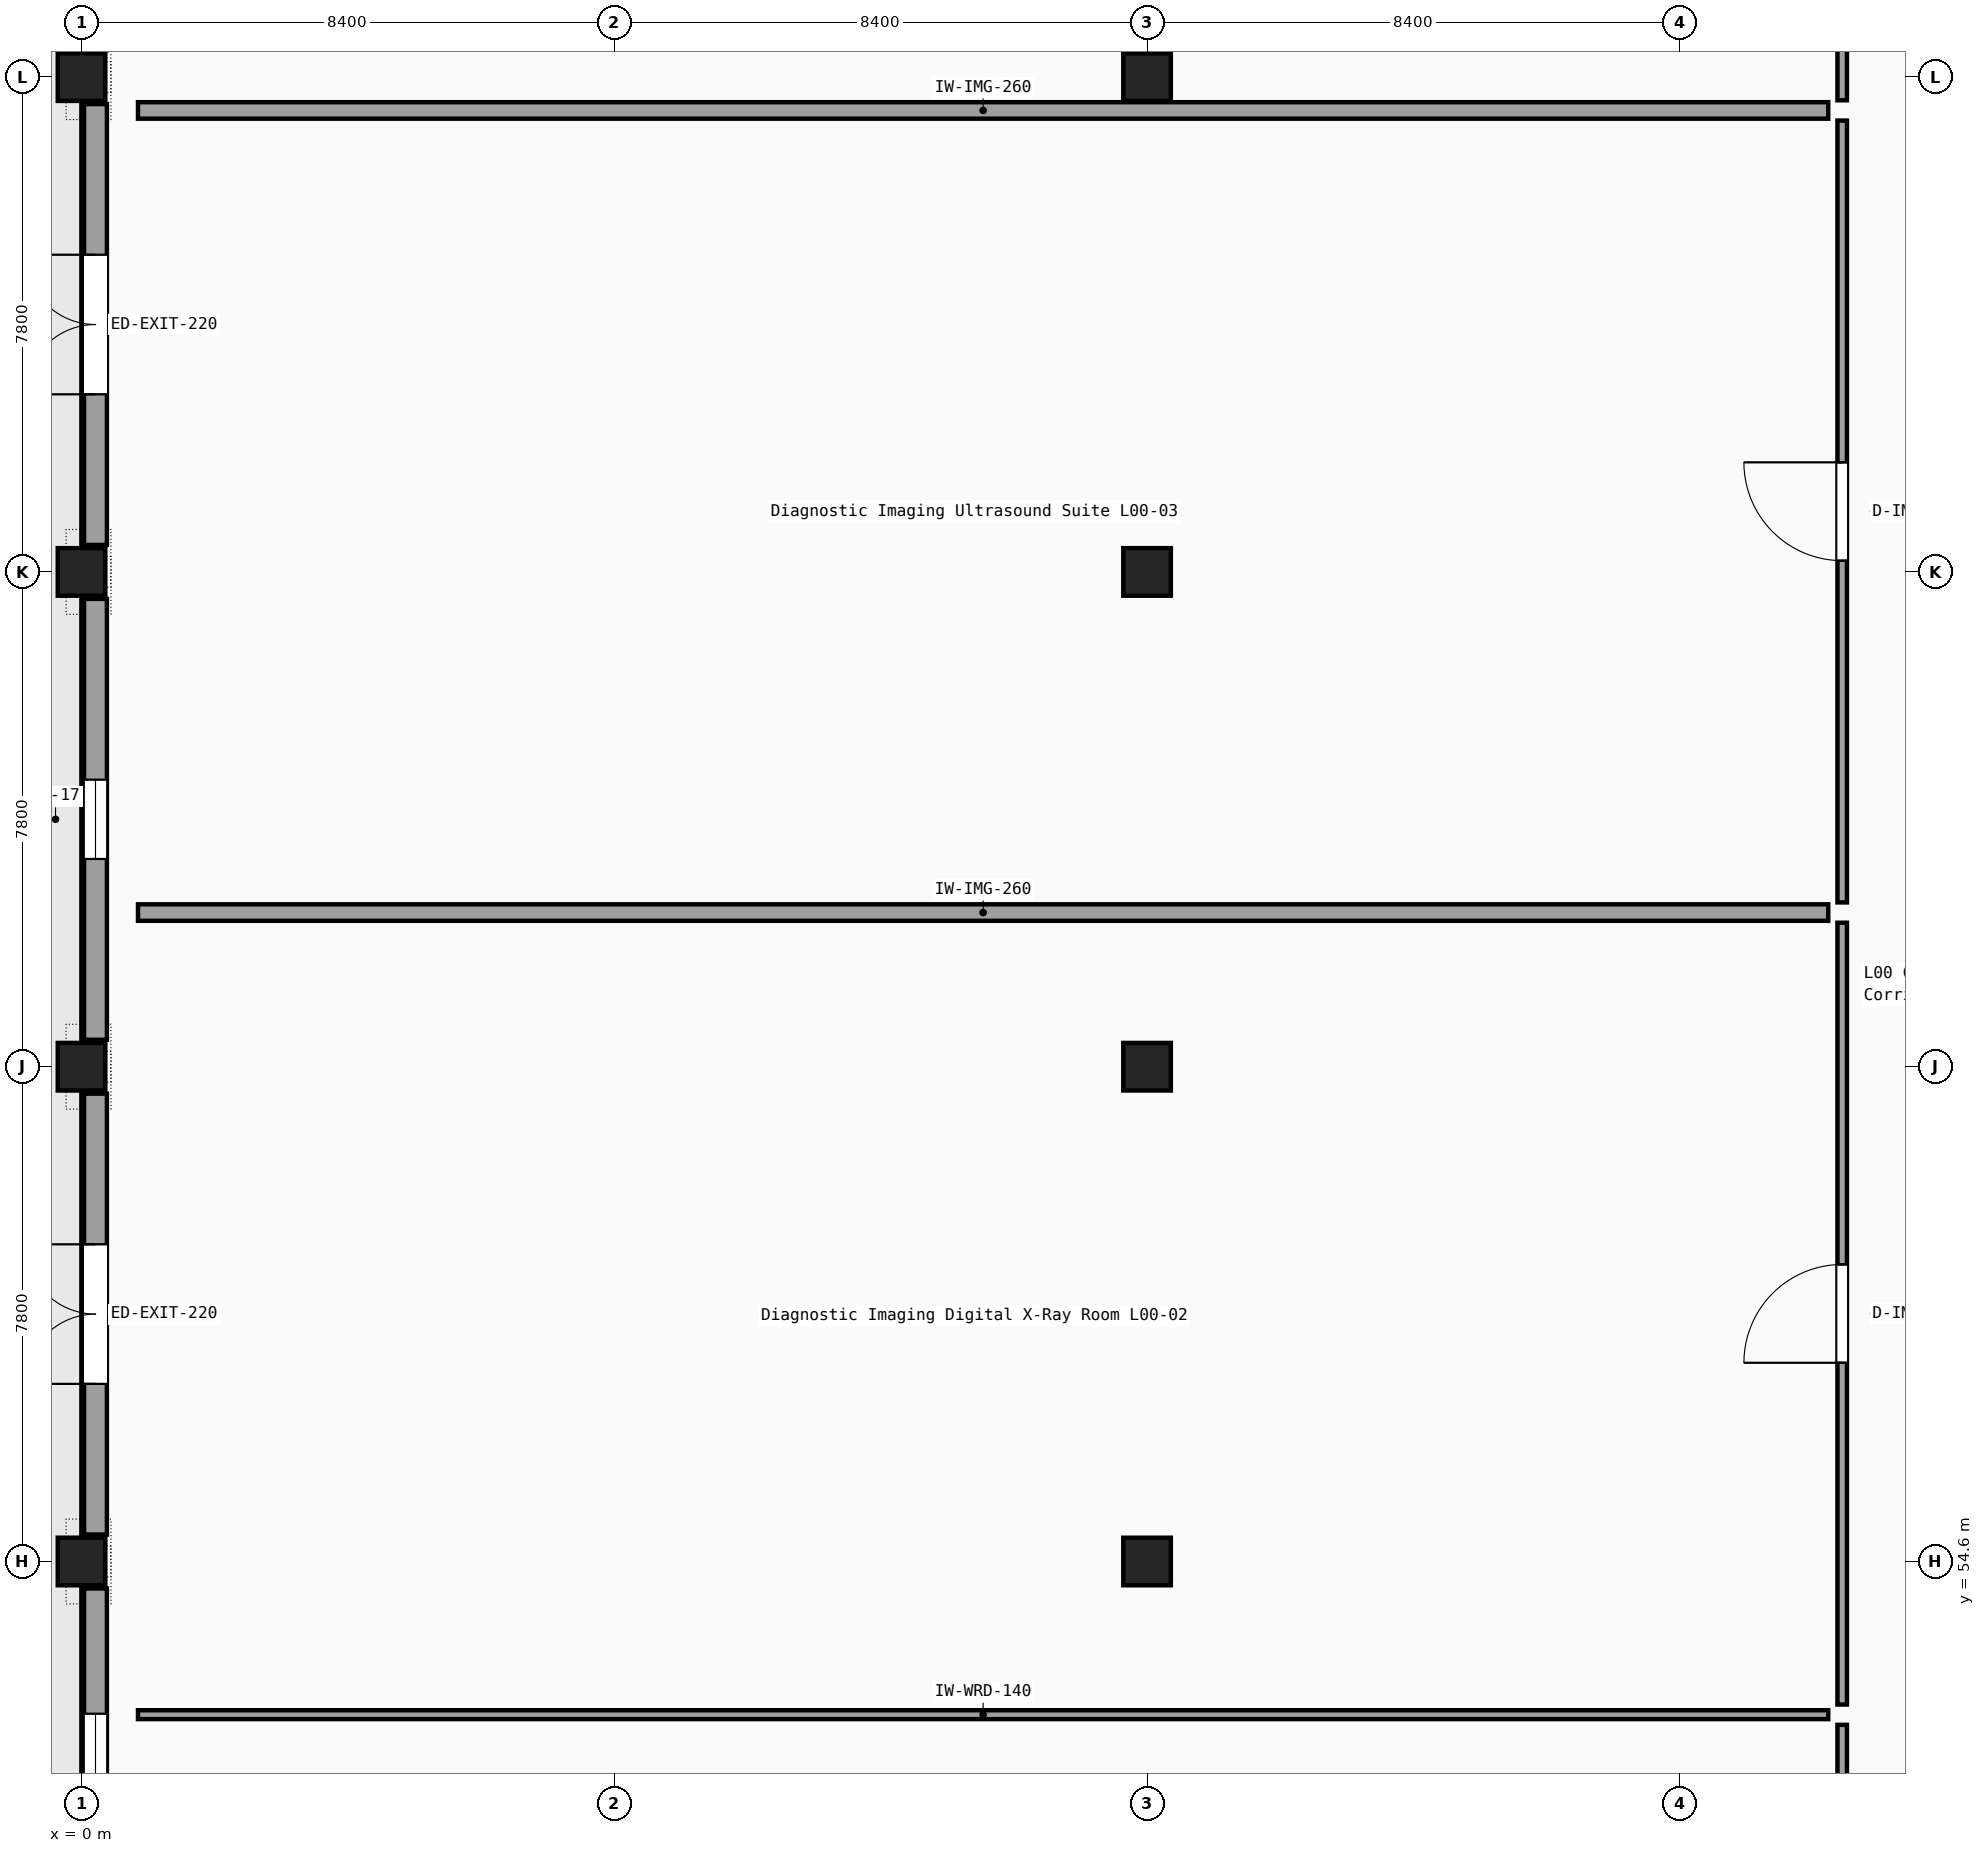
"""IFC4 building model, lengths in metres.
Left out: names, types, materials, properties, quantities, classifications, styles, units other than length and angle.
Written with IfcOpenShell. Run it as: python <this file> out.ifc"""

import sys

from ifc_helpers import new_model, si_unit, direction, frame, frame_2d, origin, origin_2d, place, context, subcontext, project, spatial, rectangle, extrude, element, fill, save


model = new_model("IFC4")
c1 = context("Model", 3, precision=1e-05, world=origin(), true_north=direction((0.0, 1.0)))
c2 = subcontext(c1, "Body", "Model", "MODEL_VIEW")
j1 = project(units=[si_unit("LENGTHUNIT", "METRE"), si_unit("PLANEANGLEUNIT", "RADIAN")], contexts=[c1])
p1 = place(None, origin())
s1 = spatial("IfcSite", under=j1, at=p1, CompositionType="ELEMENT")
p2 = place(p1, origin())
s2 = spatial("IfcBuilding", under=s1, at=p2, CompositionType="ELEMENT")
p3 = place(p2, origin())
s3 = spatial("IfcBuildingStorey", under=s2, at=p3, CompositionType="ELEMENT", Elevation=0.0)
for number, where, z_axis, x_axis in (
    (1, (0.0, 54.6, 0.0), (0.0, 0.0, 1.0), (1.0, 0.0, 0.0)),
    (2, (0.0, 62.4, 0.0), (0.0, 0.0, 1.0), (1.0, 0.0, 0.0)),
    (3, (0.0, 70.2, 0.0), (0.0, 0.0, 1.0), (1.0, 0.0, 0.0)),
    (4, (0.0, 78.0, 0.0), (0.0, 0.0, 1.0), (1.0, 0.0, 0.0)),
    (5, (16.8, 54.6, 0.0), (0.0, 0.0, 1.0), (1.0, 0.0, 0.0)),
    (6, (16.8, 62.4, 0.0), (0.0, 0.0, 1.0), (1.0, 0.0, 0.0)),
    (7, (16.8, 70.2, 0.0), (0.0, 0.0, 1.0), (1.0, 0.0, 0.0)),
    (8, (16.8, 78.0, 0.0), (0.0, 0.0, 1.0), (1.0, 0.0, 0.0)),
):
    element("IfcColumn", number, at=place(p3, frame(where, z_axis=z_axis, x_axis=x_axis)), inside=s3, PredefinedType="COLUMN", context=c2, shape_type="SweptSolid", body=[
        extrude(rectangle(XDim=0.75, YDim=0.75, at=origin_2d()), origin(), (0.0, 0.0, 1.0), 5.1),
    ])
p4 = place(p3, frame((0.22, 47.225, 0.0), z_axis=(0.0, 0.0, 1.0), x_axis=(0.0, 1.0, 0.0)))
e9 = element("IfcWall", 9, at=p4, inside=s3, PredefinedType="SOLIDWALL", context=c2, shape_type="SweptSolid", body=[
    extrude(rectangle(XDim=6.95, YDim=0.36, at=frame_2d((3.475, 0.0))), origin(), (0.0, 0.0, 1.0), 4.26),
])
p5 = place(p4, frame((1.975, 0.0, 0.7)))
e10 = element("IfcOpeningElement", 10, at=p5, cuts=e9, PredefinedType="OPENING", context=c2, shape_type="SweptSolid", body=[
    extrude(rectangle(XDim=3.0, YDim=1.85, at=frame_2d((1.5, 0.925))), frame((0.0, 0.19, 0.0), z_axis=(0.0, -1.0, 0.0), x_axis=(1.0, 0.0, 0.0)), (0.0, 0.0, 1.0), 0.38),
])
p6 = place(p3, frame((0.22, 55.025, 0.0), z_axis=(0.0, 0.0, 1.0), x_axis=(0.0, 1.0, 0.0)))
e11 = element("IfcWall", 11, at=p6, inside=s3, PredefinedType="SOLIDWALL", context=c2, shape_type="SweptSolid", body=[
    extrude(rectangle(XDim=6.95, YDim=0.36, at=frame_2d((3.475, 0.0))), origin(), (0.0, 0.0, 1.0), 4.26),
])
p7 = place(p6, frame((2.375, 0.0, 0.0)))
e12 = element("IfcOpeningElement", 12, at=p7, cuts=e11, PredefinedType="OPENING", context=c2, shape_type="SweptSolid", body=[
    extrude(rectangle(XDim=2.2, YDim=2.3, at=frame_2d((1.1, 1.15))), frame((0.0, 0.19, 0.0), z_axis=(0.0, -1.0, 0.0), x_axis=(1.0, 0.0, 0.0)), (0.0, 0.0, 1.0), 0.38),
])
p8 = place(p3, frame((0.22, 62.825, 0.0), z_axis=(0.0, 0.0, 1.0), x_axis=(0.0, 1.0, 0.0)))
e13 = element("IfcWall", 13, at=p8, inside=s3, PredefinedType="SOLIDWALL", context=c2, shape_type="SweptSolid", body=[
    extrude(rectangle(XDim=6.95, YDim=0.36, at=frame_2d((3.475, 0.0))), origin(), (0.0, 0.0, 1.0), 4.21),
])
p9 = place(p8, frame((2.85, 0.0, 0.95)))
e14 = element("IfcOpeningElement", 14, at=p9, cuts=e13, PredefinedType="OPENING", context=c2, shape_type="SweptSolid", body=[
    extrude(rectangle(XDim=1.25, YDim=1.5, at=frame_2d((0.625, 0.75))), frame((0.0, 0.19, 0.0), z_axis=(0.0, -1.0, 0.0), x_axis=(1.0, 0.0, 0.0)), (0.0, 0.0, 1.0), 0.38),
])
p10 = place(p3, frame((0.22, 70.625, 0.0), z_axis=(0.0, 0.0, 1.0), x_axis=(0.0, 1.0, 0.0)))
e15 = element("IfcWall", 15, at=p10, inside=s3, PredefinedType="SOLIDWALL", context=c2, shape_type="SweptSolid", body=[
    extrude(rectangle(XDim=6.95, YDim=0.36, at=frame_2d((3.475, 0.0))), origin(), (0.0, 0.0, 1.0), 4.21),
])
p11 = place(p10, frame((2.375, 0.0, 0.0)))
e16 = element("IfcOpeningElement", 16, at=p11, cuts=e15, PredefinedType="OPENING", context=c2, shape_type="SweptSolid", body=[
    extrude(rectangle(XDim=2.2, YDim=2.3, at=frame_2d((1.1, 1.15))), frame((0.0, 0.19, 0.0), z_axis=(0.0, -1.0, 0.0), x_axis=(1.0, 0.0, 0.0)), (0.0, 0.0, 1.0), 0.38),
])
p12 = place(p3, frame((27.76, 39.62, 0.0), z_axis=(0.0, 0.0, 1.0), x_axis=(0.0, 1.0, 0.0)))
e17 = element("IfcWall", 17, at=p12, inside=s3, PredefinedType="PARTITIONING", context=c2, shape_type="SweptSolid", body=[
    extrude(rectangle(XDim=12.405, YDim=0.15, at=frame_2d((6.202, 0.0))), origin(), (0.0, 0.0, 1.0), 4.26),
])
p13 = place(p12, frame((5.502, 0.0, 0.0)))
e18 = element("IfcOpeningElement", 18, at=p13, cuts=e17, PredefinedType="OPENING", context=c2, shape_type="SweptSolid", body=[
    extrude(rectangle(XDim=1.4, YDim=2.2, at=frame_2d((0.7, 1.1))), frame((0.0, 0.085, 0.0), z_axis=(0.0, -1.0, 0.0), x_axis=(1.0, 0.0, 0.0)), (0.0, 0.0, 1.0), 0.17),
])
p14 = place(p3, frame((0.89, 52.185, 0.0), z_axis=(0.0, 0.0, 1.0), x_axis=(1.0, 0.0, 0.0)))
e19 = element("IfcWall", 19, at=p14, inside=s3, PredefinedType="PARTITIONING", context=c2, shape_type="SweptSolid", body=[
    extrude(rectangle(XDim=26.65, YDim=0.14, at=frame_2d((13.325, 0.0))), origin(), (0.0, 0.0, 1.0), 4.46),
])
p15 = place(p3, frame((27.76, 52.345, 0.0), z_axis=(0.0, 0.0, 1.0), x_axis=(0.0, 1.0, 0.0)))
e20 = element("IfcWall", 20, at=p15, inside=s3, PredefinedType="PARTITIONING", context=c2, shape_type="SweptSolid", body=[
    extrude(rectangle(XDim=12.325, YDim=0.15, at=frame_2d((6.163, 0.0))), origin(), (0.0, 0.0, 1.0), 4.26),
])
p16 = place(p15, frame((5.387, 0.0, 0.0)))
e21 = element("IfcOpeningElement", 21, at=p16, cuts=e20, PredefinedType="OPENING", context=c2, shape_type="SweptSolid", body=[
    extrude(rectangle(XDim=1.55, YDim=2.25, at=frame_2d((0.775, 1.125))), frame((0.0, 0.085, 0.0), z_axis=(0.0, -1.0, 0.0), x_axis=(1.0, 0.0, 0.0)), (0.0, 0.0, 1.0), 0.17),
])
p17 = place(p3, frame((0.89, 64.83, 0.0), z_axis=(0.0, 0.0, 1.0), x_axis=(1.0, 0.0, 0.0)))
e22 = element("IfcWall", 22, at=p17, inside=s3, PredefinedType="PARTITIONING", context=c2, shape_type="SweptSolid", body=[
    extrude(rectangle(XDim=26.65, YDim=0.26, at=frame_2d((13.325, 0.0))), origin(), (0.0, 0.0, 1.0), 4.46),
])
p18 = place(p3, frame((27.76, 64.99, 0.0), z_axis=(0.0, 0.0, 1.0), x_axis=(0.0, 1.0, 0.0)))
e23 = element("IfcWall", 23, at=p18, inside=s3, PredefinedType="PARTITIONING", context=c2, shape_type="SweptSolid", body=[
    extrude(rectangle(XDim=12.325, YDim=0.15, at=frame_2d((6.163, 0.0))), origin(), (0.0, 0.0, 1.0), 4.26),
])
p19 = place(p18, frame((5.387, 0.0, 0.0)))
e24 = element("IfcOpeningElement", 24, at=p19, cuts=e23, PredefinedType="OPENING", context=c2, shape_type="SweptSolid", body=[
    extrude(rectangle(XDim=1.55, YDim=2.25, at=frame_2d((0.775, 1.125))), frame((0.0, 0.085, 0.0), z_axis=(0.0, -1.0, 0.0), x_axis=(1.0, 0.0, 0.0)), (0.0, 0.0, 1.0), 0.17),
])
p20 = place(p3, frame((0.89, 77.475, 0.0), z_axis=(0.0, 0.0, 1.0), x_axis=(1.0, 0.0, 0.0)))
e25 = element("IfcWall", 25, at=p20, inside=s3, PredefinedType="PARTITIONING", context=c2, shape_type="SweptSolid", body=[
    extrude(rectangle(XDim=26.65, YDim=0.26, at=frame_2d((13.325, 0.0))), origin(), (0.0, 0.0, 1.0), 4.46),
])
p21 = place(p3, frame((27.76, 77.635, 0.0), z_axis=(0.0, 0.0, 1.0), x_axis=(0.0, 1.0, 0.0)))
e26 = element("IfcWall", 26, at=p21, inside=s3, PredefinedType="PARTITIONING", context=c2, shape_type="SweptSolid", body=[
    extrude(rectangle(XDim=12.405, YDim=0.15, at=frame_2d((6.203, 0.0))), origin(), (0.0, 0.0, 1.0), 4.26),
])
p22 = place(p21, frame((5.427, 0.0, 0.0)))
e27 = element("IfcOpeningElement", 27, at=p22, cuts=e26, PredefinedType="OPENING", context=c2, shape_type="SweptSolid", body=[
    extrude(rectangle(XDim=1.55, YDim=2.25, at=frame_2d((0.775, 1.125))), frame((0.0, 0.085, 0.0), z_axis=(0.0, -1.0, 0.0), x_axis=(1.0, 0.0, 0.0)), (0.0, 0.0, 1.0), 0.17),
])
p23 = place(p5, origin())
e28 = element("IfcWindow", 28, at=p23, inside=s3, PartitioningType="SINGLE_PANEL", PredefinedType="WINDOW", context=c2, shape_type="SweptSolid", body=[
    extrude(rectangle(XDim=3.0, YDim=1.85, at=frame_2d((1.5, 0.925))), frame((0.0, 0.03, 0.0), z_axis=(0.0, -1.0, 0.0), x_axis=(1.0, 0.0, 0.0)), (0.0, 0.0, 1.0), 0.06),
])
fill(e10, e28)
p24 = place(p7, origin())
e29 = element("IfcDoor", 29, at=p24, inside=s3, OperationType="DOUBLE_DOOR_SINGLE_SWING", PredefinedType="DOOR", context=c2, shape_type="SweptSolid", body=[
    extrude(rectangle(XDim=2.2, YDim=2.3, at=frame_2d((1.1, 1.15))), frame((0.0, 0.025, 0.0), z_axis=(0.0, -1.0, 0.0), x_axis=(1.0, 0.0, 0.0)), (0.0, 0.0, 1.0), 0.05),
])
fill(e12, e29)
p25 = place(p9, origin())
e30 = element("IfcWindow", 30, at=p25, inside=s3, PartitioningType="SINGLE_PANEL", PredefinedType="WINDOW", context=c2, shape_type="SweptSolid", body=[
    extrude(rectangle(XDim=1.25, YDim=1.5, at=frame_2d((0.625, 0.75))), frame((0.0, 0.03, 0.0), z_axis=(0.0, -1.0, 0.0), x_axis=(1.0, 0.0, 0.0)), (0.0, 0.0, 1.0), 0.06),
])
fill(e14, e30)
p26 = place(p11, origin())
e31 = element("IfcDoor", 31, at=p26, inside=s3, OperationType="DOUBLE_DOOR_SINGLE_SWING", PredefinedType="DOOR", context=c2, shape_type="SweptSolid", body=[
    extrude(rectangle(XDim=2.2, YDim=2.3, at=frame_2d((1.1, 1.15))), frame((0.0, 0.025, 0.0), z_axis=(0.0, -1.0, 0.0), x_axis=(1.0, 0.0, 0.0)), (0.0, 0.0, 1.0), 0.05),
])
fill(e16, e31)
p27 = place(p16, origin())
e32 = element("IfcDoor", 32, at=p27, inside=s3, OperationType="SINGLE_SWING_LEFT", PredefinedType="DOOR", context=c2, shape_type="SweptSolid", body=[
    extrude(rectangle(XDim=1.55, YDim=2.25, at=frame_2d((0.775, 1.125))), frame((0.0, 0.025, 0.0), z_axis=(0.0, -1.0, 0.0), x_axis=(1.0, 0.0, 0.0)), (0.0, 0.0, 1.0), 0.05),
])
fill(e21, e32)
p28 = place(p19, origin())
e33 = element("IfcDoor", 33, at=p28, inside=s3, OperationType="SINGLE_SWING_RIGHT", PredefinedType="DOOR", context=c2, shape_type="SweptSolid", body=[
    extrude(rectangle(XDim=1.55, YDim=2.25, at=frame_2d((0.775, 1.125))), frame((0.0, 0.025, 0.0), z_axis=(0.0, -1.0, 0.0), x_axis=(1.0, 0.0, 0.0)), (0.0, 0.0, 1.0), 0.05),
])
fill(e24, e33)
save(model, sys.argv[1])
